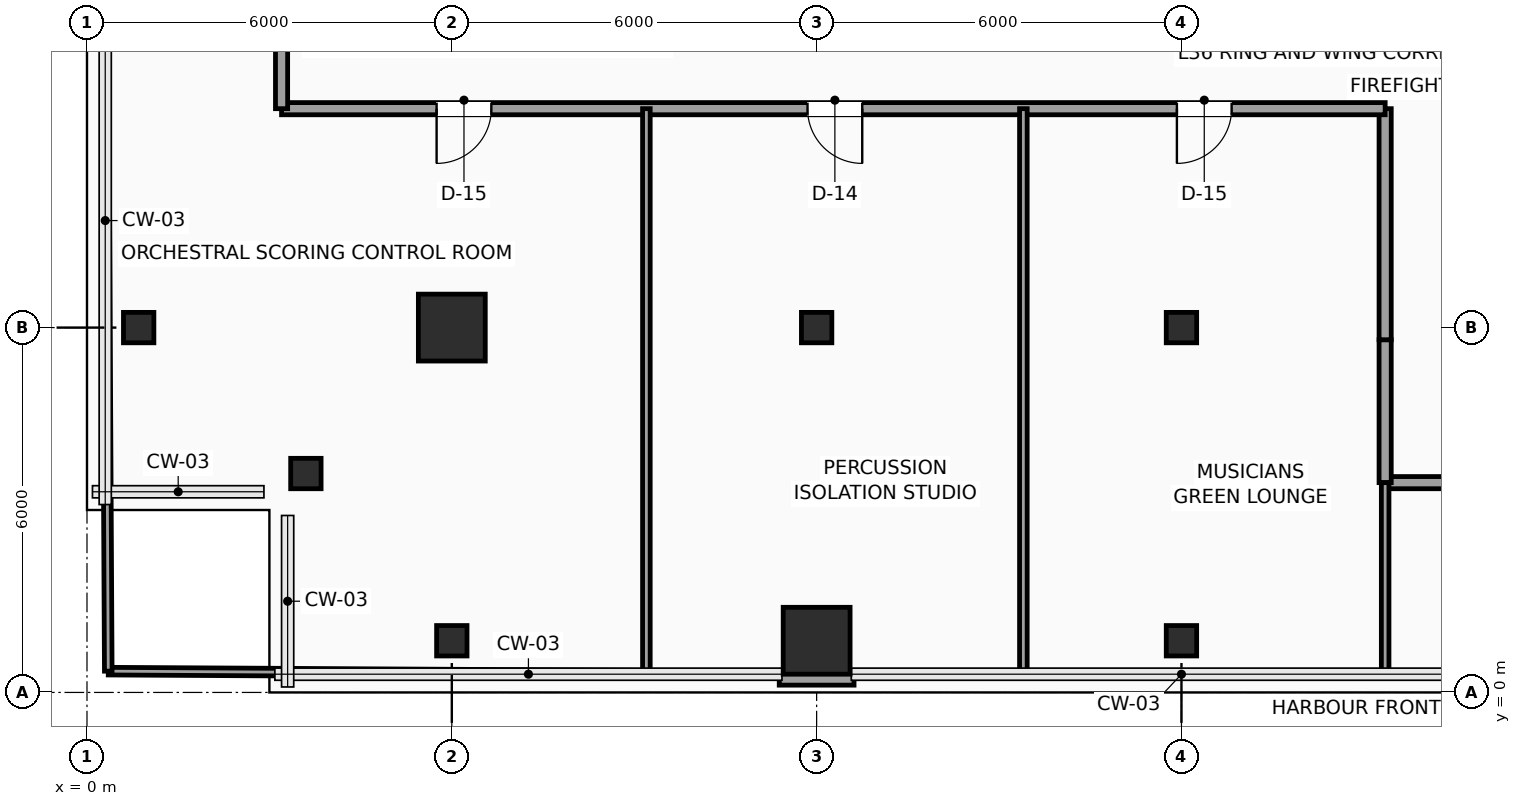
"""IFC4 building model, lengths in metres.
Left out: names, types, materials, properties, quantities, classifications, styles, units other than length and angle.
Written with IfcOpenShell. Run it as: python <this file> out.ifc"""

import sys

from ifc_helpers import new_model, si_unit, direction, frame, frame_2d, origin, origin_2d, place, context, subcontext, project, spatial, rectangle, hollow_rectangle, extrude, element, fill, save


model = new_model("IFC4")
c1 = context("Model", 3, precision=1e-05, world=origin(), true_north=direction((0.0, 1.0)))
c2 = subcontext(c1, "Body", "Model", "MODEL_VIEW")
j1 = project(units=[si_unit("LENGTHUNIT", "METRE"), si_unit("PLANEANGLEUNIT", "RADIAN")], contexts=[c1])
p1 = place(None, origin())
s1 = spatial("IfcSite", under=j1, at=p1, CompositionType="ELEMENT")
p2 = place(p1, origin())
s2 = spatial("IfcBuilding", under=s1, at=p2, CompositionType="ELEMENT")
p3 = place(p2, frame((0.0, 0.0, 149.4)))
s3 = spatial("IfcBuildingStorey", under=s2, at=p3, CompositionType="ELEMENT", Elevation=149.4)
for number, where, z_axis, x_axis in (
    (1, (3.6, 3.6, 0.0), (0.0, 0.0, 1.0), (1.0, 0.0, 0.0)),
    (2, (0.85, 6.0, 0.0), (0.0, 0.0, 1.0), (1.0, 0.0, 0.0)),
    (3, (6.0, 0.85, 0.0), (0.0, 0.0, 1.0), (1.0, 0.0, 0.0)),
):
    element("IfcColumn", number, at=place(p3, frame(where, z_axis=z_axis, x_axis=x_axis)), inside=s3, PredefinedType="COLUMN", context=c2, shape_type="SweptSolid", body=[
        extrude(hollow_rectangle(XDim=0.5, YDim=0.5, WallThickness=0.025, InnerFilletRadius=0.025, OuterFilletRadius=0.04, at=origin_2d()), origin(), (0.0, 0.0, 1.0), 3.75),
    ])
for number, where, z_axis, x_axis in (
    (4, (6.0, 6.0, 0.0), (0.0, 0.0, 1.0), (1.0, 0.0, 0.0)),
    (5, (12.0, 0.85, 0.0), (0.0, 0.0, 1.0), (1.0, 0.0, 0.0)),
):
    element("IfcColumn", number, at=place(p3, frame(where, z_axis=z_axis, x_axis=x_axis)), inside=s3, PredefinedType="COLUMN", context=c2, shape_type="SweptSolid", body=[
        extrude(rectangle(XDim=1.1, YDim=1.1, at=origin_2d()), origin(), (0.0, 0.0, 1.0), 3.75),
    ])
for number, where, z_axis, x_axis in (
    (6, (12.0, 6.0, 0.0), (0.0, 0.0, 1.0), (1.0, 0.0, 0.0)),
    (7, (18.0, 0.85, 0.0), (0.0, 0.0, 1.0), (1.0, 0.0, 0.0)),
    (8, (18.0, 6.0, 0.0), (0.0, 0.0, 1.0), (1.0, 0.0, 0.0)),
):
    element("IfcColumn", number, at=place(p3, frame(where, z_axis=z_axis, x_axis=x_axis)), inside=s3, PredefinedType="COLUMN", context=c2, shape_type="SweptSolid", body=[
        extrude(hollow_rectangle(XDim=0.5, YDim=0.5, WallThickness=0.025, InnerFilletRadius=0.025, OuterFilletRadius=0.04, at=origin_2d()), origin(), (0.0, 0.0, 1.0), 3.75),
    ])
p4 = place(p3, frame((12.615, 0.24, 0.0), z_axis=(0.0, 0.0, 1.0), x_axis=(-1.0, 0.0, 0.0)))
e9 = element("IfcWall", 9, at=p4, inside=s3, PredefinedType="SOLIDWALL", context=c2, shape_type="SweptSolid", body=[
    extrude(rectangle(XDim=1.23, YDim=0.24, at=frame_2d((0.615, 0.0))), origin(), (0.0, 0.0, 1.0), 3.525),
])
p5 = place(p3, frame((23.95, 3.45, 0.0), z_axis=(0.0, 0.0, 1.0), x_axis=(-1.0, 0.0, 0.0)))
e10 = element("IfcWall", 10, at=p5, inside=s3, PredefinedType="SOLIDWALL", context=c2, shape_type="SweptSolid", body=[
    extrude(rectangle(XDim=2.6, YDim=0.2, at=frame_2d((1.3, 0.0))), origin(), (0.0, 0.0, 1.0), 3.067),
])
p6 = place(p3, frame((21.35, 3.45, 0.0), z_axis=(0.0, 0.0, 1.0), x_axis=(0.0, 1.0, 0.0)))
e11 = element("IfcWall", 11, at=p6, inside=s3, PredefinedType="SOLIDWALL", context=c2, shape_type="SweptSolid", body=[
    extrude(rectangle(XDim=2.35, YDim=0.2, at=frame_2d((1.175, 0.0))), origin(), (0.0, 0.0, 1.0), 3.525),
])
p7 = place(p3, frame((21.35, 5.8, 0.0), z_axis=(0.0, 0.0, 1.0), x_axis=(0.0, 1.0, 0.0)))
e12 = element("IfcWall", 12, at=p7, inside=s3, PredefinedType="SOLIDWALL", context=c2, shape_type="SweptSolid", body=[
    extrude(rectangle(XDim=3.8, YDim=0.2, at=frame_2d((1.9, 0.0))), origin(), (0.0, 0.0, 1.0), 3.525),
])
p8 = place(p3, frame((21.35, 9.6, 0.0), z_axis=(0.0, 0.0, 1.0), x_axis=(-1.0, 0.0, 0.0)))
e13 = element("IfcWall", 13, at=p8, inside=s3, PredefinedType="SOLIDWALL", context=c2, shape_type="SweptSolid", body=[
    extrude(rectangle(XDim=18.15, YDim=0.2, at=frame_2d((9.075, 0.0))), origin(), (0.0, 0.0, 1.0), 3.525),
])
p9 = place(p8, frame((14.7, 0.0, 0.0)))
e14 = element("IfcOpeningElement", 14, at=p9, cuts=e13, PredefinedType="OPENING", context=c2, shape_type="SweptSolid", body=[
    extrude(rectangle(XDim=0.9, YDim=2.1, at=frame_2d((0.45, 1.05))), frame((0.0, 0.11, 0.0), z_axis=(0.0, -1.0, 0.0), x_axis=(1.0, 0.0, 0.0)), (0.0, 0.0, 1.0), 0.22),
])
p10 = place(p8, frame((8.6, 0.0, 0.0)))
e15 = element("IfcOpeningElement", 15, at=p10, cuts=e13, PredefinedType="OPENING", context=c2, shape_type="SweptSolid", body=[
    extrude(rectangle(XDim=0.9, YDim=2.1, at=frame_2d((0.45, 1.05))), frame((0.0, 0.11, 0.0), z_axis=(0.0, -1.0, 0.0), x_axis=(1.0, 0.0, 0.0)), (0.0, 0.0, 1.0), 0.22),
])
p11 = place(p8, frame((2.525, 0.0, 0.0)))
e16 = element("IfcOpeningElement", 16, at=p11, cuts=e13, PredefinedType="OPENING", context=c2, shape_type="SweptSolid", body=[
    extrude(rectangle(XDim=0.9, YDim=2.1, at=frame_2d((0.45, 1.05))), frame((0.0, 0.11, 0.0), z_axis=(0.0, -1.0, 0.0), x_axis=(1.0, 0.0, 0.0)), (0.0, 0.0, 1.0), 0.22),
])
p12 = place(p3, frame((3.2, 9.6, 0.0), z_axis=(0.0, 0.0, 1.0), x_axis=(0.0, 1.0, 0.0)))
e17 = element("IfcWall", 17, at=p12, inside=s3, PredefinedType="SOLIDWALL", context=c2, shape_type="SweptSolid", body=[
    extrude(rectangle(XDim=2.05, YDim=0.2, at=frame_2d((1.025, 0.0))), origin(), (0.0, 0.0, 1.0), 3.525),
])
p13 = place(p3, frame((21.35, 0.3, 0.0), z_axis=(0.0, 0.0, 1.0), x_axis=(0.0, 1.0, 0.0)))
e18 = element("IfcWall", 18, at=p13, inside=s3, PredefinedType="PARTITIONING", context=c2, shape_type="SweptSolid", body=[
    extrude(rectangle(XDim=3.15, YDim=0.125, at=frame_2d((1.575, 0.0))), origin(), (0.0, 0.0, 1.0), 3.525),
])
p14 = place(p3, frame((0.35, 0.35, 0.0), z_axis=(0.0, 0.0, 1.0), x_axis=(0.999984009014, -0.005655237989, 0.0)))
e19 = element("IfcWall", 19, at=p14, inside=s3, PredefinedType="PARTITIONING", context=c2, shape_type="SweptSolid", body=[
    extrude(rectangle(XDim=8.85, YDim=0.125, at=frame_2d((4.425, 0.0))), origin(), (0.0, 0.0, 1.0), 3.525),
])
p15 = place(p3, frame((0.35, 0.35, 0.0), z_axis=(0.0, 0.0, 1.0), x_axis=(-0.005410604923, 0.99998536257, 0.0)))
e20 = element("IfcWall", 20, at=p15, inside=s3, PredefinedType="PARTITIONING", context=c2, shape_type="SweptSolid", body=[
    extrude(rectangle(XDim=9.25, YDim=0.125, at=frame_2d((4.625, 0.0))), origin(), (0.0, 0.0, 1.0), 3.525),
])
for number, where, z_axis, x_axis in (
    (21, (9.2, 0.3, 0.0), (0.0, 0.0, 1.0), (0.0, 1.0, 0.0)),
    (22, (15.4, 0.3, 0.0), (0.0, 0.0, 1.0), (0.0, 1.0, 0.0)),
):
    element("IfcWall", number, at=place(p3, frame(where, z_axis=z_axis, x_axis=x_axis)), inside=s3, PredefinedType="PARTITIONING", context=c2, shape_type="SweptSolid", body=[
        extrude(rectangle(XDim=9.3, YDim=0.125, at=frame_2d((4.65, 0.0))), origin(), (0.0, 0.0, 1.0), 3.525),
    ])
p16 = place(p9, origin())
e23 = element("IfcDoor", 23, at=p16, inside=s3, OperationType="SINGLE_SWING_RIGHT", PredefinedType="DOOR", context=c2, shape_type="SweptSolid", body=[
    extrude(rectangle(XDim=0.9, YDim=2.1, at=frame_2d((0.45, 1.05))), frame((0.0, 0.025, 0.0), z_axis=(0.0, -1.0, 0.0), x_axis=(1.0, 0.0, 0.0)), (0.0, 0.0, 1.0), 0.05),
])
fill(e14, e23)
p17 = place(p10, origin())
e24 = element("IfcDoor", 24, at=p17, inside=s3, OperationType="SINGLE_SWING_LEFT", PredefinedType="DOOR", context=c2, shape_type="SweptSolid", body=[
    extrude(rectangle(XDim=0.9, YDim=2.1, at=frame_2d((0.45, 1.05))), frame((0.0, 0.025, 0.0), z_axis=(0.0, -1.0, 0.0), x_axis=(1.0, 0.0, 0.0)), (0.0, 0.0, 1.0), 0.05),
])
fill(e15, e24)
p18 = place(p11, origin())
e25 = element("IfcDoor", 25, at=p18, inside=s3, OperationType="SINGLE_SWING_RIGHT", PredefinedType="DOOR", context=c2, shape_type="SweptSolid", body=[
    extrude(rectangle(XDim=0.9, YDim=2.1, at=frame_2d((0.45, 1.05))), frame((0.0, 0.025, 0.0), z_axis=(0.0, -1.0, 0.0), x_axis=(1.0, 0.0, 0.0)), (0.0, 0.0, 1.0), 0.05),
])
fill(e16, e25)
save(model, sys.argv[1])
